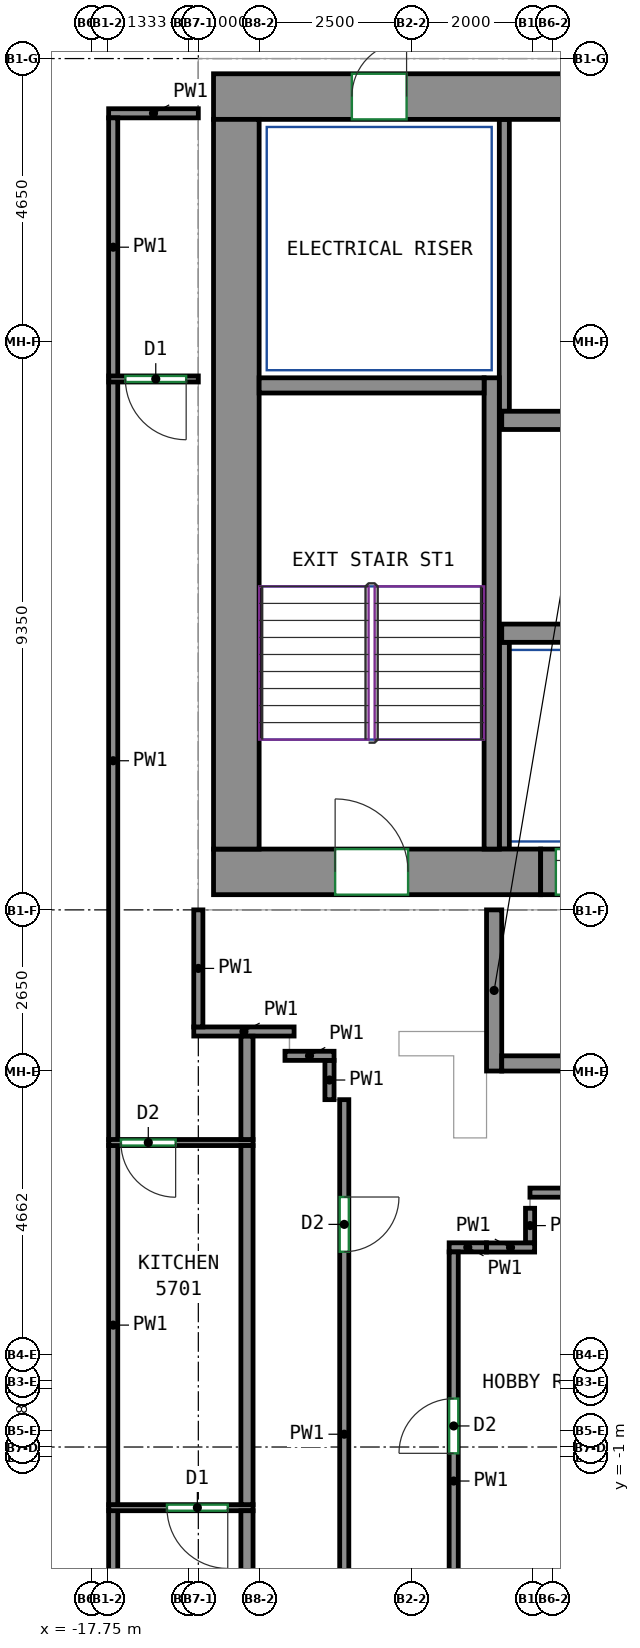
"""IFC4 building model, lengths in metres.
Left out: names, types, materials, properties, quantities, classifications, styles, units other than length and angle.
Written with IfcOpenShell. Run it as: python <this file> out.ifc"""

import sys

from ifc_helpers import new_model, si_unit, direction, frame, frame_2d, origin, place, context, subcontext, project, spatial, rectangle, extrude, source, transform, mapped, element, fill, save


model = new_model("IFC4")
c1 = context("Model", 3, precision=1e-05, world=origin(), true_north=direction((0.0, 1.0)))
c2 = subcontext(c1, "Body", "Model", "MODEL_VIEW")
j1 = project(units=[si_unit("LENGTHUNIT", "METRE"), si_unit("PLANEANGLEUNIT", "RADIAN")], contexts=[c1])
p1 = place(None, origin())
s1 = spatial("IfcSite", under=j1, at=p1, CompositionType="ELEMENT")
p2 = place(p1, origin())
s2 = spatial("IfcBuilding", under=s1, at=p2, CompositionType="ELEMENT")
p3 = place(p2, frame((0.0, 0.0, 239.0)))
s3 = spatial("IfcBuildingStorey", under=s2, at=p3, CompositionType="ELEMENT", Elevation=239.0)
m1 = source(origin(), c2, "Body", "SweptSolid", [
    extrude(rectangle(XDim=5.38, YDim=0.75, at=frame_2d((2.69, 0.0))), origin(), (0.0, 0.0, 1.0), 3.12),
])
p4 = place(p3, frame((-15.75, 8.625, 0.0), z_axis=(0.0, 0.0, 1.0), x_axis=(1.0, 0.0, 0.0)))
e1 = element("IfcWall", 1, at=p4, inside=s3, PredefinedType="SHEAR", context=c2, shape_type="MappedRepresentation", body=[
    mapped(m1, transform((0.0, 0.0, 0.0))),
])
p5 = place(p4, frame((2.0, 0.0, 0.0)))
e2 = element("IfcOpeningElement", 2, at=p5, cuts=e1, PredefinedType="OPENING", context=c2, shape_type="SweptSolid", body=[
    extrude(rectangle(XDim=1.2, YDim=2.1, at=frame_2d((0.6, 1.05))), frame((0.0, 0.385, 0.0), z_axis=(0.0, -1.0, 0.0), x_axis=(1.0, 0.0, 0.0)), (0.0, 0.0, 1.0), 0.77),
])
m2 = source(origin(), c2, "Body", "SweptSolid", [
    extrude(rectangle(XDim=33.6, YDim=0.75, at=frame_2d((16.8, 0.0))), origin(), (0.0, 0.0, 1.0), 3.12),
])
p6 = place(p3, frame((-15.75, 21.375, 0.0), z_axis=(0.0, 0.0, 1.0), x_axis=(1.0, 0.0, 0.0)))
e3 = element("IfcWall", 3, at=p6, inside=s3, PredefinedType="SHEAR", context=c2, shape_type="MappedRepresentation", body=[
    mapped(m2, transform((0.0, 0.0, 0.0))),
])
p7 = place(p6, frame((8.27, 0.0, 0.0)))
e4 = element("IfcOpeningElement", 4, at=p7, cuts=e3, PredefinedType="OPENING", context=c2, shape_type="SweptSolid", body=[
    extrude(rectangle(XDim=0.9, YDim=2.1, at=frame_2d((0.45, 1.05))), frame((0.0, 0.385, 0.0), z_axis=(0.0, -1.0, 0.0), x_axis=(1.0, 0.0, 0.0)), (0.0, 0.0, 1.0), 0.77),
])
p8 = place(p6, frame((14.97, 0.0, 0.0)))
e5 = element("IfcOpeningElement", 5, at=p8, cuts=e3, PredefinedType="OPENING", context=c2, shape_type="SweptSolid", body=[
    extrude(rectangle(XDim=0.9, YDim=2.1, at=frame_2d((0.45, 1.05))), frame((0.0, 0.385, 0.0), z_axis=(0.0, -1.0, 0.0), x_axis=(1.0, 0.0, 0.0)), (0.0, 0.0, 1.0), 0.77),
])
p9 = place(p6, frame((19.794, 0.0, 0.0)))
e6 = element("IfcOpeningElement", 6, at=p9, cuts=e3, PredefinedType="OPENING", context=c2, shape_type="SweptSolid", body=[
    extrude(rectangle(XDim=0.9, YDim=2.1, at=frame_2d((0.45, 1.05))), frame((0.0, 0.385, 0.0), z_axis=(0.0, -1.0, 0.0), x_axis=(1.0, 0.0, 0.0)), (0.0, 0.0, 1.0), 0.77),
])
p10 = place(p6, frame((25.154, 0.0, 0.0)))
e7 = element("IfcOpeningElement", 7, at=p10, cuts=e3, PredefinedType="OPENING", context=c2, shape_type="SweptSolid", body=[
    extrude(rectangle(XDim=0.9, YDim=2.1, at=frame_2d((0.45, 1.05))), frame((0.0, 0.385, 0.0), z_axis=(0.0, -1.0, 0.0), x_axis=(1.0, 0.0, 0.0)), (0.0, 0.0, 1.0), 0.77),
])
p11 = place(p6, frame((2.275, 0.0, 0.0)))
e8 = element("IfcOpeningElement", 8, at=p11, cuts=e3, PredefinedType="OPENING", context=c2, shape_type="SweptSolid", body=[
    extrude(rectangle(XDim=0.9, YDim=2.1, at=frame_2d((0.45, 1.05))), frame((0.0, 0.385, 0.0), z_axis=(0.0, -1.0, 0.0), x_axis=(1.0, 0.0, 0.0)), (0.0, 0.0, 1.0), 0.77),
])
p12 = place(p6, frame((30.425, 0.0, 0.0)))
e9 = element("IfcOpeningElement", 9, at=p12, cuts=e3, PredefinedType="OPENING", context=c2, shape_type="SweptSolid", body=[
    extrude(rectangle(XDim=0.9, YDim=2.1, at=frame_2d((0.45, 1.05))), frame((0.0, 0.385, 0.0), z_axis=(0.0, -1.0, 0.0), x_axis=(1.0, 0.0, 0.0)), (0.0, 0.0, 1.0), 0.77),
])
m3 = source(origin(), c2, "Body", "SweptSolid", [
    extrude(rectangle(XDim=12.0, YDim=0.75, at=frame_2d((6.0, 0.0))), origin(), (0.0, 0.0, 1.0), 3.12),
])
p13 = place(p3, frame((-15.375, 9.0, 0.0), z_axis=(0.0, 0.0, 1.0), x_axis=(0.0, 1.0, 0.0)))
e10 = element("IfcWall", 10, at=p13, inside=s3, PredefinedType="SHEAR", context=c2, shape_type="MappedRepresentation", body=[
    mapped(m3, transform((0.0, 0.0, 0.0))),
])
m4 = source(origin(), c2, "Body", "SweptSolid", [
    extrude(rectangle(XDim=7.75, YDim=0.25, at=frame_2d((3.875, 0.0))), origin(), (0.0, 0.0, 1.0), 3.12),
])
p14 = place(p3, frame((-11.175, 9.0, 0.0), z_axis=(0.0, 0.0, 1.0), x_axis=(0.0, 1.0, 0.0)))
e11 = element("IfcWall", 11, at=p14, inside=s3, PredefinedType="SHEAR", context=c2, shape_type="MappedRepresentation", body=[
    mapped(m4, transform((0.0, 0.0, 0.0))),
])
m5 = source(origin(), c2, "Body", "SweptSolid", [
    extrude(rectangle(XDim=3.7, YDim=0.25, at=frame_2d((1.85, 0.0))), origin(), (0.0, 0.0, 1.0), 3.12),
])
p15 = place(p3, frame((-15.0, 16.625, 0.0), z_axis=(0.0, 0.0, 1.0), x_axis=(1.0, 0.0, 0.0)))
e12 = element("IfcWall", 12, at=p15, inside=s3, PredefinedType="SHEAR", context=c2, shape_type="MappedRepresentation", body=[
    mapped(m5, transform((0.0, 0.0, 0.0))),
])
m6 = source(origin(), c2, "Body", "SweptSolid", [
    extrude(rectangle(XDim=6.0, YDim=0.3, at=frame_2d((3.0, 0.0))), origin(), (0.0, 0.0, 1.0), 3.12),
])
p16 = place(p3, frame((-11.01, 12.55, 0.0), z_axis=(0.0, 0.0, 1.0), x_axis=(1.0, 0.0, 0.0)))
e13 = element("IfcWall", 13, at=p16, inside=s3, PredefinedType="SHEAR", context=c2, shape_type="MappedRepresentation", body=[
    mapped(m6, transform((0.0, 0.0, 0.0))),
])
m7 = source(origin(), c2, "Body", "SweptSolid", [
    extrude(rectangle(XDim=22.08, YDim=0.3, at=frame_2d((11.04, 0.0))), origin(), (0.0, 0.0, 1.0), 3.12),
])
p17 = place(p3, frame((-11.01, 16.05, 0.0), z_axis=(0.0, 0.0, 1.0), x_axis=(1.0, 0.0, 0.0)))
e14 = element("IfcWall", 14, at=p17, inside=s3, PredefinedType="SHEAR", context=c2, shape_type="MappedRepresentation", body=[
    mapped(m7, transform((0.0, 0.0, 0.0))),
])
m8 = source(origin(), c2, "Body", "SweptSolid", [
    extrude(rectangle(XDim=2.65, YDim=0.25, at=frame_2d((1.325, 0.0))), origin(), (0.0, 0.0, 1.0), 2.57),
])
p18 = place(p3, frame((-11.135, 5.35, 0.0), z_axis=(0.0, 0.0, 1.0), x_axis=(0.0, 1.0, 0.0)))
e15 = element("IfcWall", 15, at=p18, inside=s3, PredefinedType="PARTITIONING", context=c2, shape_type="MappedRepresentation", body=[
    mapped(m8, transform((0.0, 0.0, 0.0))),
])
m9 = source(origin(), c2, "Body", "SweptSolid", [
    extrude(rectangle(XDim=5.36, YDim=0.25, at=frame_2d((2.68, 0.0))), origin(), (0.0, 0.0, 1.0), 3.12),
])
p19 = place(p3, frame((-11.01, 5.475, 0.0), z_axis=(0.0, 0.0, 1.0), x_axis=(1.0, 0.0, 0.0)))
e16 = element("IfcWall", 16, at=p19, inside=s3, PredefinedType="PARTITIONING", context=c2, shape_type="MappedRepresentation", body=[
    mapped(m9, transform((0.0, 0.0, 0.0))),
])
p20 = place(p19, frame((2.28, 0.0, 0.0)))
e17 = element("IfcOpeningElement", 17, at=p20, cuts=e16, PredefinedType="OPENING", context=c2, shape_type="SweptSolid", body=[
    extrude(rectangle(XDim=0.8, YDim=2.0, at=frame_2d((0.4, 1.0))), frame((0.0, 0.135, 0.0), z_axis=(0.0, -1.0, 0.0), x_axis=(1.0, 0.0, 0.0)), (0.0, 0.0, 1.0), 0.27),
])
m10 = source(origin(), c2, "Body", "SweptSolid", [
    extrude(rectangle(XDim=4.8, YDim=0.165, at=frame_2d((2.4, 0.0))), origin(), (0.0, 0.0, 1.0), 3.12),
])
p21 = place(p3, frame((-10.968, 16.2, 0.0), z_axis=(0.0, 0.0, 1.0), x_axis=(0.0, 1.0, 0.0)))
e18 = element("IfcWall", 18, at=p21, inside=s3, PredefinedType="PARTITIONING", context=c2, shape_type="MappedRepresentation", body=[
    mapped(m10, transform((0.0, 0.0, 0.0))),
])
m11 = source(origin(), c2, "Body", "SweptSolid", [
    extrude(rectangle(XDim=3.4, YDim=0.165, at=frame_2d((1.7, 0.0))), origin(), (0.0, 0.0, 1.0), 3.12),
])
p22 = place(p3, frame((-10.968, 9.0, 0.0), z_axis=(0.0, 0.0, 1.0), x_axis=(0.0, 1.0, 0.0)))
e19 = element("IfcWall", 19, at=p22, inside=s3, PredefinedType="PARTITIONING", context=c2, shape_type="MappedRepresentation", body=[
    mapped(m11, transform((0.0, 0.0, 0.0))),
])
m12 = source(origin(), c2, "Body", "SweptSolid", [
    extrude(rectangle(XDim=1.4, YDim=0.75, at=frame_2d((0.7, 0.0))), origin(), (0.0, 0.0, 1.0), 2.7),
])
p23 = place(p3, frame((-10.37, 8.625, 0.0), z_axis=(0.0, 0.0, 1.0), x_axis=(1.0, 0.0, 0.0)))
e20 = element("IfcWall", 20, at=p23, inside=s3, PredefinedType="PARTITIONING", context=c2, shape_type="MappedRepresentation", body=[
    mapped(m12, transform((0.0, 0.0, 0.0))),
])
p24 = place(p23, frame((0.25, 0.0, 0.0)))
e21 = element("IfcOpeningElement", 21, at=p24, cuts=e20, PredefinedType="OPENING", context=c2, shape_type="SweptSolid", body=[
    extrude(rectangle(XDim=0.9, YDim=2.1, at=frame_2d((0.45, 1.05))), frame((0.0, 0.385, 0.0), z_axis=(0.0, -1.0, 0.0), x_axis=(1.0, 0.0, 0.0)), (0.0, 0.0, 1.0), 0.77),
])
p25 = place(p3, frame((-17.4, -6.125, 0.0), z_axis=(0.0, 0.0, 1.0), x_axis=(0.0, 1.0, 0.0)))
e22 = element("IfcWall", 22, at=p25, inside=s3, PredefinedType="PARTITIONING", context=c2, shape_type="SweptSolid", body=[
    extrude(rectangle(XDim=4.254, YDim=0.15, at=frame_2d((2.127, 0.0))), origin(), (0.0, 0.0, 1.0), 3.12),
])
p26 = place(p25, frame((1.015, 0.0, 0.0)))
e23 = element("IfcOpeningElement", 23, at=p26, cuts=e22, PredefinedType="OPENING", context=c2, shape_type="SweptSolid", body=[
    extrude(rectangle(XDim=1.0, YDim=2.1, at=frame_2d((0.5, 1.05))), frame((0.0, 0.085, 0.0), z_axis=(0.0, -1.0, 0.0), x_axis=(1.0, 0.0, 0.0)), (0.0, 0.0, 1.0), 0.17),
])
p27 = place(p3, frame((-17.4, -1.791, 0.0), z_axis=(0.0, 0.0, 1.0), x_axis=(0.0, 1.0, 0.0)))
e24 = element("IfcWall", 24, at=p27, inside=s3, PredefinedType="PARTITIONING", context=c2, shape_type="SweptSolid", body=[
    extrude(rectangle(XDim=5.925, YDim=0.15, at=frame_2d((2.962, 0.0))), origin(), (0.0, 0.0, 1.0), 3.12),
])
p28 = place(p3, frame((-17.4, 4.214, 0.0), z_axis=(0.0, 0.0, 1.0), x_axis=(0.0, 1.0, 0.0)))
e25 = element("IfcWall", 25, at=p28, inside=s3, PredefinedType="PARTITIONING", context=c2, shape_type="SweptSolid", body=[
    extrude(rectangle(XDim=12.477, YDim=0.15, at=frame_2d((6.238, 0.0))), origin(), (0.0, 0.0, 1.0), 3.12),
])
p29 = place(p3, frame((-16.075, 6.0, 0.0), z_axis=(0.0, 0.0, 1.0), x_axis=(1.0, 0.0, 0.0)))
e26 = element("IfcWall", 26, at=p29, inside=s3, PredefinedType="PARTITIONING", context=c2, shape_type="SweptSolid", body=[
    extrude(rectangle(XDim=1.65, YDim=0.15, at=frame_2d((0.825, 0.0))), origin(), (0.0, 0.0, 1.0), 3.12),
])
p30 = place(p3, frame((-16.0, 6.075, 0.0), z_axis=(0.0, 0.0, 1.0), x_axis=(0.0, 1.0, 0.0)))
e27 = element("IfcWall", 27, at=p30, inside=s3, PredefinedType="PARTITIONING", context=c2, shape_type="SweptSolid", body=[
    extrude(rectangle(XDim=1.925, YDim=0.15, at=frame_2d((0.962, 0.0))), origin(), (0.0, 0.0, 1.0), 3.12),
])
p31 = place(p3, frame((-17.475, 21.1, 0.0), z_axis=(0.0, 0.0, 1.0), x_axis=(1.0, 0.0, 0.0)))
e28 = element("IfcWall", 28, at=p31, inside=s3, PredefinedType="PARTITIONING", context=c2, shape_type="SweptSolid", body=[
    extrude(rectangle(XDim=1.475, YDim=0.15, at=frame_2d((0.738, 0.0))), origin(), (0.0, 0.0, 1.0), 3.12),
])
p32 = place(p3, frame((-17.4, 16.771, 0.0), z_axis=(0.0, 0.0, 1.0), x_axis=(0.0, 1.0, 0.0)))
e29 = element("IfcWall", 29, at=p32, inside=s3, PredefinedType="PARTITIONING", context=c2, shape_type="SweptSolid", body=[
    extrude(rectangle(XDim=4.254, YDim=0.15, at=frame_2d((2.127, 0.0))), origin(), (0.0, 0.0, 1.0), 3.12),
])
p33 = place(p3, frame((-13.6, 4.879, 0.0), z_axis=(0.0, 0.0, 1.0), x_axis=(0.0, -1.0, 0.0)))
e30 = element("IfcWall", 30, at=p33, inside=s3, PredefinedType="PARTITIONING", context=c2, shape_type="SweptSolid", body=[
    extrude(rectangle(XDim=11.004, YDim=0.15, at=frame_2d((5.502, 0.0))), origin(), (0.0, 0.0, 1.0), 3.12),
])
p34 = place(p33, frame((1.601, 0.0, 0.0)))
e31 = element("IfcOpeningElement", 31, at=p34, cuts=e30, PredefinedType="OPENING", context=c2, shape_type="SweptSolid", body=[
    extrude(rectangle(XDim=0.9, YDim=2.1, at=frame_2d((0.45, 1.05))), frame((0.0, 0.085, 0.0), z_axis=(0.0, -1.0, 0.0), x_axis=(1.0, 0.0, 0.0)), (0.0, 0.0, 1.0), 0.17),
])
p35 = place(p3, frame((-13.843, 5.525, 0.0), z_axis=(0.0, 0.0, 1.0), x_axis=(0.0, -1.0, 0.0)))
e32 = element("IfcWall", 32, at=p35, inside=s3, PredefinedType="PARTITIONING", context=c2, shape_type="SweptSolid", body=[
    extrude(rectangle(XDim=0.646, YDim=0.15, at=frame_2d((0.323, 0.0))), origin(), (0.0, 0.0, 1.0), 3.12),
])
p36 = place(p3, frame((-14.575, 5.6, 0.0), z_axis=(0.0, 0.0, 1.0), x_axis=(1.0, 0.0, 0.0)))
e33 = element("IfcWall", 33, at=p36, inside=s3, PredefinedType="PARTITIONING", context=c2, shape_type="SweptSolid", body=[
    extrude(rectangle(XDim=0.807, YDim=0.15, at=frame_2d((0.403, 0.0))), origin(), (0.0, 0.0, 1.0), 3.12),
])
p37 = place(p3, frame((-10.546, 3.35, 0.0), z_axis=(0.0, 0.0, 1.0), x_axis=(1.0, 0.0, 0.0)))
e34 = element("IfcWall", 34, at=p37, inside=s3, PredefinedType="PARTITIONING", context=c2, shape_type="SweptSolid", body=[
    extrude(rectangle(XDim=3.896, YDim=0.15, at=frame_2d((1.948, 0.0))), origin(), (0.0, 0.0, 1.0), 3.12),
])
p38 = place(p3, frame((-10.544, 2.523, 0.0), z_axis=(0.0, 0.0, 1.0), x_axis=(0.0, 1.0, 0.0)))
e35 = element("IfcWall", 35, at=p38, inside=s3, PredefinedType="PARTITIONING", context=c2, shape_type="SweptSolid", body=[
    extrude(rectangle(XDim=0.57, YDim=0.15, at=frame_2d((0.285, 0.0))), origin(), (0.0, 0.0, 1.0), 3.12),
])
p39 = place(p3, frame((-11.262, 2.448, 0.0), z_axis=(0.0, 0.0, 1.0), x_axis=(1.0, 0.0, 0.0)))
e36 = element("IfcWall", 36, at=p39, inside=s3, PredefinedType="PARTITIONING", context=c2, shape_type="SweptSolid", body=[
    extrude(rectangle(XDim=0.793, YDim=0.15, at=frame_2d((0.396, 0.0))), origin(), (0.0, 0.0, 1.0), 3.12),
])
p40 = place(p3, frame((-11.875, 2.45, 0.0), z_axis=(0.0, 0.0, 1.0), x_axis=(1.0, 0.0, 0.0)))
e37 = element("IfcWall", 37, at=p40, inside=s3, PredefinedType="PARTITIONING", context=c2, shape_type="SweptSolid", body=[
    extrude(rectangle(XDim=0.613, YDim=0.15, at=frame_2d((0.307, 0.0))), origin(), (0.0, 0.0, 1.0), 3.12),
])
p41 = place(p3, frame((-11.8, -5.16, 0.0), z_axis=(0.0, 0.0, 1.0), x_axis=(0.0, 1.0, 0.0)))
e38 = element("IfcWall", 38, at=p41, inside=s3, PredefinedType="PARTITIONING", context=c2, shape_type="SweptSolid", body=[
    extrude(rectangle(XDim=7.535, YDim=0.15, at=frame_2d((3.768, 0.0))), origin(), (0.0, 0.0, 1.0), 3.12),
])
p42 = place(p41, frame((4.223, 0.0, 0.0)))
e39 = element("IfcOpeningElement", 39, at=p42, cuts=e38, PredefinedType="OPENING", context=c2, shape_type="SweptSolid", body=[
    extrude(rectangle(XDim=0.9, YDim=2.1, at=frame_2d((0.45, 1.05))), frame((0.0, 0.085, 0.0), z_axis=(0.0, -1.0, 0.0), x_axis=(1.0, 0.0, 0.0)), (0.0, 0.0, 1.0), 0.17),
])
p43 = place(p3, frame((-15.1, -1.831, 0.0), z_axis=(0.0, 0.0, 1.0), x_axis=(-1.0, 0.0, 0.0)))
e40 = element("IfcWall", 40, at=p43, inside=s3, PredefinedType="PARTITIONING", context=c2, shape_type="SweptSolid", body=[
    extrude(rectangle(XDim=2.373, YDim=0.1, at=frame_2d((1.187, 0.0))), origin(), (0.0, 0.0, 1.0), 3.12),
])
p44 = place(p43, frame((0.416, 0.0, 0.0)))
e41 = element("IfcOpeningElement", 41, at=p44, cuts=e40, PredefinedType="OPENING", context=c2, shape_type="SweptSolid", body=[
    extrude(rectangle(XDim=1.0, YDim=2.1, at=frame_2d((0.5, 1.05))), frame((0.0, 0.06, 0.0), z_axis=(0.0, -1.0, 0.0), x_axis=(1.0, 0.0, 0.0)), (0.0, 0.0, 1.0), 0.12),
])
p45 = place(p3, frame((-15.2, -6.123, 0.0), z_axis=(0.0, 0.0, 1.0), x_axis=(0.0, 1.0, 0.0)))
e42 = element("IfcWall", 42, at=p45, inside=s3, PredefinedType="PARTITIONING", context=c2, shape_type="SweptSolid", body=[
    extrude(rectangle(XDim=4.242, YDim=0.2, at=frame_2d((2.121, 0.0))), origin(), (0.0, 0.0, 1.0), 3.12),
])
p46 = place(p3, frame((-15.1, 4.174, 0.0), z_axis=(0.0, 0.0, 1.0), x_axis=(-1.0, 0.0, 0.0)))
e43 = element("IfcWall", 43, at=p46, inside=s3, PredefinedType="PARTITIONING", context=c2, shape_type="SweptSolid", body=[
    extrude(rectangle(XDim=2.373, YDim=0.1, at=frame_2d((1.187, 0.0))), origin(), (0.0, 0.0, 1.0), 3.12),
])
p47 = place(p46, frame((1.273, 0.0, 0.0)))
e44 = element("IfcOpeningElement", 44, at=p47, cuts=e43, PredefinedType="OPENING", context=c2, shape_type="SweptSolid", body=[
    extrude(rectangle(XDim=0.9, YDim=2.1, at=frame_2d((0.45, 1.05))), frame((0.0, 0.06, 0.0), z_axis=(0.0, -1.0, 0.0), x_axis=(1.0, 0.0, 0.0)), (0.0, 0.0, 1.0), 0.12),
])
p48 = place(p3, frame((-15.2, -1.781, 0.0), z_axis=(0.0, 0.0, 1.0), x_axis=(0.0, 1.0, 0.0)))
e45 = element("IfcWall", 45, at=p48, inside=s3, PredefinedType="PARTITIONING", context=c2, shape_type="SweptSolid", body=[
    extrude(rectangle(XDim=5.905, YDim=0.2, at=frame_2d((2.953, 0.0))), origin(), (0.0, 0.0, 1.0), 3.12),
])
p49 = place(p3, frame((-16.0, 16.731, 0.0), z_axis=(0.0, 0.0, 1.0), x_axis=(-1.0, 0.0, 0.0)))
e46 = element("IfcWall", 46, at=p49, inside=s3, PredefinedType="PARTITIONING", context=c2, shape_type="SweptSolid", body=[
    extrude(rectangle(XDim=1.473, YDim=0.1, at=frame_2d((0.736, 0.0))), origin(), (0.0, 0.0, 1.0), 3.12),
])
p50 = place(p49, frame((0.2, 0.0, 0.0)))
e47 = element("IfcOpeningElement", 47, at=p50, cuts=e46, PredefinedType="OPENING", context=c2, shape_type="SweptSolid", body=[
    extrude(rectangle(XDim=1.0, YDim=2.1, at=frame_2d((0.5, 1.05))), frame((0.0, 0.06, 0.0), z_axis=(0.0, -1.0, 0.0), x_axis=(1.0, 0.0, 0.0)), (0.0, 0.0, 1.0), 0.12),
])
p51 = place(p3, frame((-15.2, 4.224, 0.0), z_axis=(0.0, 0.0, 1.0), x_axis=(0.0, 1.0, 0.0)))
e48 = element("IfcWall", 48, at=p51, inside=s3, PredefinedType="PARTITIONING", context=c2, shape_type="SweptSolid", body=[
    extrude(rectangle(XDim=1.699, YDim=0.2, at=frame_2d((0.85, 0.0))), origin(), (0.0, 0.0, 1.0), 3.12),
])
p52 = place(p24, origin())
e49 = element("IfcDoor", 49, at=p52, inside=s3, OperationType="SLIDING_TO_LEFT", PredefinedType="DOOR", context=c2, shape_type="SweptSolid", body=[
    extrude(rectangle(XDim=0.9, YDim=2.1, at=frame_2d((0.45, 1.05))), frame((0.0, 0.28, 0.0), z_axis=(0.0, -1.0, 0.0), x_axis=(1.0, 0.0, 0.0)), (0.0, 0.0, 1.0), 0.05),
])
fill(e21, e49)
p53 = place(p11, origin())
e50 = element("IfcDoor", 50, at=p53, inside=s3, OperationType="SINGLE_SWING_RIGHT", PredefinedType="DOOR", context=c2, shape_type="SweptSolid", body=[
    extrude(rectangle(XDim=0.9, YDim=2.1, at=frame_2d((0.45, 1.05))), frame((0.0, -0.23, 0.0), z_axis=(0.0, -1.0, 0.0), x_axis=(1.0, 0.0, 0.0)), (0.0, 0.0, 1.0), 0.05),
])
fill(e8, e50)
p54 = place(p5, origin())
e51 = element("IfcDoor", 51, at=p54, inside=s3, OperationType="DOUBLE_DOOR_SINGLE_SWING", PredefinedType="DOOR", context=c2, shape_type="SweptSolid", body=[
    extrude(rectangle(XDim=1.2, YDim=2.1, at=frame_2d((0.6, 1.05))), frame((0.0, 0.28, 0.0), z_axis=(0.0, -1.0, 0.0), x_axis=(1.0, 0.0, 0.0)), (0.0, 0.0, 1.0), 0.05),
])
fill(e2, e51)
p55 = place(p44, origin())
e52 = element("IfcDoor", 52, at=p55, inside=s3, OperationType="SINGLE_SWING_LEFT", PredefinedType="DOOR", context=c2, shape_type="SweptSolid", body=[
    extrude(rectangle(XDim=1.0, YDim=2.1, at=frame_2d((0.5, 1.05))), frame((0.0, 0.025, 0.0), z_axis=(0.0, -1.0, 0.0), x_axis=(1.0, 0.0, 0.0)), (0.0, 0.0, 1.0), 0.05),
])
fill(e41, e52)
p56 = place(p42, origin())
e53 = element("IfcDoor", 53, at=p56, inside=s3, OperationType="SINGLE_SWING_LEFT", PredefinedType="DOOR", context=c2, shape_type="SweptSolid", body=[
    extrude(rectangle(XDim=0.9, YDim=2.1, at=frame_2d((0.45, 1.05))), frame((0.0, 0.025, 0.0), z_axis=(0.0, -1.0, 0.0), x_axis=(1.0, 0.0, 0.0)), (0.0, 0.0, 1.0), 0.05),
])
fill(e39, e53)
p57 = place(p34, origin())
e54 = element("IfcDoor", 54, at=p57, inside=s3, OperationType="SINGLE_SWING_LEFT", PredefinedType="DOOR", context=c2, shape_type="SweptSolid", body=[
    extrude(rectangle(XDim=0.9, YDim=2.1, at=frame_2d((0.45, 1.05))), frame((0.0, 0.025, 0.0), z_axis=(0.0, -1.0, 0.0), x_axis=(1.0, 0.0, 0.0)), (0.0, 0.0, 1.0), 0.05),
])
fill(e31, e54)
p58 = place(p47, origin())
e55 = element("IfcDoor", 55, at=p58, inside=s3, OperationType="SINGLE_SWING_LEFT", PredefinedType="DOOR", context=c2, shape_type="SweptSolid", body=[
    extrude(rectangle(XDim=0.9, YDim=2.1, at=frame_2d((0.45, 1.05))), frame((0.0, 0.025, 0.0), z_axis=(0.0, -1.0, 0.0), x_axis=(1.0, 0.0, 0.0)), (0.0, 0.0, 1.0), 0.05),
])
fill(e44, e55)
p59 = place(p50, origin())
e56 = element("IfcDoor", 56, at=p59, inside=s3, OperationType="SINGLE_SWING_LEFT", PredefinedType="DOOR", context=c2, shape_type="SweptSolid", body=[
    extrude(rectangle(XDim=1.0, YDim=2.1, at=frame_2d((0.5, 1.05))), frame((0.0, 0.025, 0.0), z_axis=(0.0, -1.0, 0.0), x_axis=(1.0, 0.0, 0.0)), (0.0, 0.0, 1.0), 0.05),
])
fill(e47, e56)
save(model, sys.argv[1])
